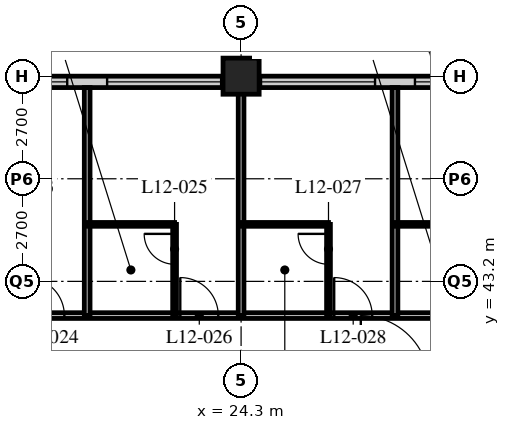
"""IFC4 building model, lengths in metres.
Left out: names, types, materials, properties, quantities, classifications, styles, units other than length and angle.
Written with IfcOpenShell. Run it as: python <this file> out.ifc"""

import sys

from ifc_helpers import new_model, si_unit, direction, frame, frame_2d, origin, origin_2d, place, context, subcontext, project, spatial, rectangle, hollow_rectangle, extrude, element, fill, save


model = new_model("IFC4")
c1 = context("Model", 3, precision=1e-05, world=origin(), true_north=direction((0.0, 1.0)))
c2 = subcontext(c1, "Body", "Model", "MODEL_VIEW")
j1 = project(units=[si_unit("LENGTHUNIT", "METRE"), si_unit("PLANEANGLEUNIT", "RADIAN")], contexts=[c1])
p1 = place(None, origin())
s1 = spatial("IfcSite", under=j1, at=p1, CompositionType="ELEMENT")
p2 = place(p1, origin())
s2 = spatial("IfcBuilding", under=s1, at=p2, CompositionType="ELEMENT")
p3 = place(p2, frame((0.0, 0.0, 53.4)))
s3 = spatial("IfcBuildingStorey", under=s2, at=p3, CompositionType="ELEMENT", Elevation=53.4)
p4 = place(p3, frame((24.3, 48.6, 0.0), z_axis=(0.0, 0.0, 1.0), x_axis=(1.0, 0.0, 0.0)))
e1 = element("IfcColumn", 1, at=p4, inside=s3, PredefinedType="COLUMN", context=c2, shape_type="SweptSolid", body=[
    extrude(hollow_rectangle(XDim=0.95, YDim=0.95, WallThickness=0.095, at=origin_2d()), origin(), (0.0, 0.0, 1.0), 3.4),
])
p5 = place(p3, frame((48.3, 48.45, 0.0), z_axis=(0.0, 0.0, 1.0), x_axis=(-1.0, 0.0, 0.0)))
e2 = element("IfcWall", 2, at=p5, inside=s3, PredefinedType="SOLIDWALL", context=c2, shape_type="SweptSolid", body=[
    extrude(rectangle(XDim=40.2, YDim=0.3, at=frame_2d((20.1, 0.0))), origin(), (0.0, 0.0, 1.0), 3.19),
])
p6 = place(p5, frame((0.225, 0.0, 0.9)))
e3 = element("IfcOpeningElement", 3, at=p6, cuts=e2, PredefinedType="OPENING", context=c2, shape_type="SweptSolid", body=[
    extrude(rectangle(XDim=3.0, YDim=2.0, at=frame_2d((1.5, 1.0))), frame((0.0, 0.16, 0.0), z_axis=(0.0, -1.0, 0.0), x_axis=(1.0, 0.0, 0.0)), (0.0, 0.0, 1.0), 0.32),
])
p7 = place(p5, frame((4.275, 0.0, 0.9)))
e4 = element("IfcOpeningElement", 4, at=p7, cuts=e2, PredefinedType="OPENING", context=c2, shape_type="SweptSolid", body=[
    extrude(rectangle(XDim=3.0, YDim=2.0, at=frame_2d((1.5, 1.0))), frame((0.0, 0.16, 0.0), z_axis=(0.0, -1.0, 0.0), x_axis=(1.0, 0.0, 0.0)), (0.0, 0.0, 1.0), 0.32),
])
p8 = place(p5, frame((8.325, 0.0, 0.9)))
e5 = element("IfcOpeningElement", 5, at=p8, cuts=e2, PredefinedType="OPENING", context=c2, shape_type="SweptSolid", body=[
    extrude(rectangle(XDim=3.0, YDim=2.0, at=frame_2d((1.5, 1.0))), frame((0.0, 0.16, 0.0), z_axis=(0.0, -1.0, 0.0), x_axis=(1.0, 0.0, 0.0)), (0.0, 0.0, 1.0), 0.32),
])
p9 = place(p5, frame((12.375, 0.0, 0.9)))
e6 = element("IfcOpeningElement", 6, at=p9, cuts=e2, PredefinedType="OPENING", context=c2, shape_type="SweptSolid", body=[
    extrude(rectangle(XDim=3.0, YDim=2.0, at=frame_2d((1.5, 1.0))), frame((0.0, 0.16, 0.0), z_axis=(0.0, -1.0, 0.0), x_axis=(1.0, 0.0, 0.0)), (0.0, 0.0, 1.0), 0.32),
])
p10 = place(p5, frame((16.425, 0.0, 0.9)))
e7 = element("IfcOpeningElement", 7, at=p10, cuts=e2, PredefinedType="OPENING", context=c2, shape_type="SweptSolid", body=[
    extrude(rectangle(XDim=3.0, YDim=2.0, at=frame_2d((1.5, 1.0))), frame((0.0, 0.16, 0.0), z_axis=(0.0, -1.0, 0.0), x_axis=(1.0, 0.0, 0.0)), (0.0, 0.0, 1.0), 0.32),
])
p11 = place(p5, frame((20.475, 0.0, 0.9)))
e8 = element("IfcOpeningElement", 8, at=p11, cuts=e2, PredefinedType="OPENING", context=c2, shape_type="SweptSolid", body=[
    extrude(rectangle(XDim=3.0, YDim=2.0, at=frame_2d((1.5, 1.0))), frame((0.0, 0.16, 0.0), z_axis=(0.0, -1.0, 0.0), x_axis=(1.0, 0.0, 0.0)), (0.0, 0.0, 1.0), 0.32),
])
p12 = place(p5, frame((24.525, 0.0, 0.9)))
e9 = element("IfcOpeningElement", 9, at=p12, cuts=e2, PredefinedType="OPENING", context=c2, shape_type="SweptSolid", body=[
    extrude(rectangle(XDim=3.0, YDim=2.0, at=frame_2d((1.5, 1.0))), frame((0.0, 0.16, 0.0), z_axis=(0.0, -1.0, 0.0), x_axis=(1.0, 0.0, 0.0)), (0.0, 0.0, 1.0), 0.32),
])
p13 = place(p5, frame((28.575, 0.0, 0.9)))
e10 = element("IfcOpeningElement", 10, at=p13, cuts=e2, PredefinedType="OPENING", context=c2, shape_type="SweptSolid", body=[
    extrude(rectangle(XDim=3.0, YDim=2.0, at=frame_2d((1.5, 1.0))), frame((0.0, 0.16, 0.0), z_axis=(0.0, -1.0, 0.0), x_axis=(1.0, 0.0, 0.0)), (0.0, 0.0, 1.0), 0.32),
])
p14 = place(p5, frame((32.625, 0.0, 0.9)))
e11 = element("IfcOpeningElement", 11, at=p14, cuts=e2, PredefinedType="OPENING", context=c2, shape_type="SweptSolid", body=[
    extrude(rectangle(XDim=3.0, YDim=2.0, at=frame_2d((1.5, 1.0))), frame((0.0, 0.16, 0.0), z_axis=(0.0, -1.0, 0.0), x_axis=(1.0, 0.0, 0.0)), (0.0, 0.0, 1.0), 0.32),
])
p15 = place(p5, frame((36.675, 0.0, 0.9)))
e12 = element("IfcOpeningElement", 12, at=p15, cuts=e2, PredefinedType="OPENING", context=c2, shape_type="SweptSolid", body=[
    extrude(rectangle(XDim=3.0, YDim=2.0, at=frame_2d((1.5, 1.0))), frame((0.0, 0.16, 0.0), z_axis=(0.0, -1.0, 0.0), x_axis=(1.0, 0.0, 0.0)), (0.0, 0.0, 1.0), 0.32),
])
p16 = place(p3, frame((12.15, 42.3, 0.0), z_axis=(0.0, 0.0, 1.0), x_axis=(1.0, 0.0, 0.0)))
e13 = element("IfcWall", 13, at=p16, inside=s3, PredefinedType="PARTITIONING", context=c2, shape_type="SweptSolid", body=[
    extrude(rectangle(XDim=32.4, YDim=0.15, at=frame_2d((16.2, 0.0))), origin(), (0.0, 0.0, 1.0), 3.19),
])
p17 = place(p16, frame((6.5, 0.0, 0.0)))
e14 = element("IfcOpeningElement", 14, at=p17, cuts=e13, PredefinedType="OPENING", context=c2, shape_type="SweptSolid", body=[
    extrude(rectangle(XDim=1.0, YDim=2.1, at=frame_2d((0.5, 1.05))), frame((0.0, 0.085, 0.0), z_axis=(0.0, -1.0, 0.0), x_axis=(1.0, 0.0, 0.0)), (0.0, 0.0, 1.0), 0.17),
])
p18 = place(p16, frame((10.55, 0.0, 0.0)))
e15 = element("IfcOpeningElement", 15, at=p18, cuts=e13, PredefinedType="OPENING", context=c2, shape_type="SweptSolid", body=[
    extrude(rectangle(XDim=1.0, YDim=2.1, at=frame_2d((0.5, 1.05))), frame((0.0, 0.085, 0.0), z_axis=(0.0, -1.0, 0.0), x_axis=(1.0, 0.0, 0.0)), (0.0, 0.0, 1.0), 0.17),
])
p19 = place(p16, frame((14.6, 0.0, 0.0)))
e16 = element("IfcOpeningElement", 16, at=p19, cuts=e13, PredefinedType="OPENING", context=c2, shape_type="SweptSolid", body=[
    extrude(rectangle(XDim=1.0, YDim=2.1, at=frame_2d((0.5, 1.05))), frame((0.0, 0.085, 0.0), z_axis=(0.0, -1.0, 0.0), x_axis=(1.0, 0.0, 0.0)), (0.0, 0.0, 1.0), 0.17),
])
p20 = place(p16, frame((18.65, 0.0, 0.0)))
e17 = element("IfcOpeningElement", 17, at=p20, cuts=e13, PredefinedType="OPENING", context=c2, shape_type="SweptSolid", body=[
    extrude(rectangle(XDim=1.0, YDim=2.1, at=frame_2d((0.5, 1.05))), frame((0.0, 0.085, 0.0), z_axis=(0.0, -1.0, 0.0), x_axis=(1.0, 0.0, 0.0)), (0.0, 0.0, 1.0), 0.17),
])
p21 = place(p16, frame((22.7, 0.0, 0.0)))
e18 = element("IfcOpeningElement", 18, at=p21, cuts=e13, PredefinedType="OPENING", context=c2, shape_type="SweptSolid", body=[
    extrude(rectangle(XDim=1.0, YDim=2.1, at=frame_2d((0.5, 1.05))), frame((0.0, 0.085, 0.0), z_axis=(0.0, -1.0, 0.0), x_axis=(1.0, 0.0, 0.0)), (0.0, 0.0, 1.0), 0.17),
])
p22 = place(p16, frame((26.75, 0.0, 0.0)))
e19 = element("IfcOpeningElement", 19, at=p22, cuts=e13, PredefinedType="OPENING", context=c2, shape_type="SweptSolid", body=[
    extrude(rectangle(XDim=1.0, YDim=2.1, at=frame_2d((0.5, 1.05))), frame((0.0, 0.085, 0.0), z_axis=(0.0, -1.0, 0.0), x_axis=(1.0, 0.0, 0.0)), (0.0, 0.0, 1.0), 0.17),
])
p23 = place(p16, frame((28.775, 0.0, 0.0)))
e20 = element("IfcOpeningElement", 20, at=p23, cuts=e13, PredefinedType="OPENING", context=c2, shape_type="SweptSolid", body=[
    extrude(rectangle(XDim=1.0, YDim=2.1, at=frame_2d((0.5, 1.05))), frame((0.0, 0.085, 0.0), z_axis=(0.0, -1.0, 0.0), x_axis=(1.0, 0.0, 0.0)), (0.0, 0.0, 1.0), 0.17),
])
p24 = place(p16, frame((2.625, 0.0, 0.0)))
e21 = element("IfcOpeningElement", 21, at=p24, cuts=e13, PredefinedType="OPENING", context=c2, shape_type="SweptSolid", body=[
    extrude(rectangle(XDim=1.0, YDim=2.1, at=frame_2d((0.5, 1.05))), frame((0.0, 0.085, 0.0), z_axis=(0.0, -1.0, 0.0), x_axis=(1.0, 0.0, 0.0)), (0.0, 0.0, 1.0), 0.17),
])
p25 = place(p3, frame((20.25, 42.3, 0.0), z_axis=(0.0, 0.0, 1.0), x_axis=(0.0, 1.0, 0.0)))
e22 = element("IfcWall", 22, at=p25, inside=s3, PredefinedType="PARTITIONING", context=c2, shape_type="SweptSolid", body=[
    extrude(rectangle(XDim=6.0, YDim=0.15, at=frame_2d((3.0, 0.0))), origin(), (0.0, 0.0, 1.0), 3.19),
])
p26 = place(p3, frame((20.25, 44.7, 0.0), z_axis=(0.0, 0.0, 1.0), x_axis=(1.0, 0.0, 0.0)))
e23 = element("IfcWall", 23, at=p26, inside=s3, PredefinedType="PARTITIONING", context=c2, shape_type="SweptSolid", body=[
    extrude(rectangle(XDim=2.3, YDim=0.1, at=frame_2d((1.15, 0.0))), origin(), (0.0, 0.0, 1.0), 3.19),
])
p27 = place(p3, frame((22.55, 42.3, 0.0), z_axis=(0.0, 0.0, 1.0), x_axis=(0.0, 1.0, 0.0)))
e24 = element("IfcWall", 24, at=p27, inside=s3, PredefinedType="PARTITIONING", context=c2, shape_type="SweptSolid", body=[
    extrude(rectangle(XDim=2.4, YDim=0.1, at=frame_2d((1.2, 0.0))), origin(), (0.0, 0.0, 1.0), 3.19),
])
p28 = place(p27, frame((1.35, 0.0, 0.0)))
e25 = element("IfcOpeningElement", 25, at=p28, cuts=e24, PredefinedType="OPENING", context=c2, shape_type="SweptSolid", body=[
    extrude(rectangle(XDim=0.8, YDim=2.1, at=frame_2d((0.4, 1.05))), frame((0.0, 0.06, 0.0), z_axis=(0.0, -1.0, 0.0), x_axis=(1.0, 0.0, 0.0)), (0.0, 0.0, 1.0), 0.12),
])
p29 = place(p3, frame((24.3, 42.3, 0.0), z_axis=(0.0, 0.0, 1.0), x_axis=(0.0, 1.0, 0.0)))
e26 = element("IfcWall", 26, at=p29, inside=s3, PredefinedType="PARTITIONING", context=c2, shape_type="SweptSolid", body=[
    extrude(rectangle(XDim=6.0, YDim=0.15, at=frame_2d((3.0, 0.0))), origin(), (0.0, 0.0, 1.0), 2.578),
])
p30 = place(p3, frame((24.3, 44.7, 0.0), z_axis=(0.0, 0.0, 1.0), x_axis=(1.0, 0.0, 0.0)))
e27 = element("IfcWall", 27, at=p30, inside=s3, PredefinedType="PARTITIONING", context=c2, shape_type="SweptSolid", body=[
    extrude(rectangle(XDim=2.3, YDim=0.1, at=frame_2d((1.15, 0.0))), origin(), (0.0, 0.0, 1.0), 3.19),
])
p31 = place(p3, frame((26.6, 42.3, 0.0), z_axis=(0.0, 0.0, 1.0), x_axis=(0.0, 1.0, 0.0)))
e28 = element("IfcWall", 28, at=p31, inside=s3, PredefinedType="PARTITIONING", context=c2, shape_type="SweptSolid", body=[
    extrude(rectangle(XDim=2.4, YDim=0.1, at=frame_2d((1.2, 0.0))), origin(), (0.0, 0.0, 1.0), 3.19),
])
p32 = place(p31, frame((1.35, 0.0, 0.0)))
e29 = element("IfcOpeningElement", 29, at=p32, cuts=e28, PredefinedType="OPENING", context=c2, shape_type="SweptSolid", body=[
    extrude(rectangle(XDim=0.8, YDim=2.1, at=frame_2d((0.4, 1.05))), frame((0.0, 0.06, 0.0), z_axis=(0.0, -1.0, 0.0), x_axis=(1.0, 0.0, 0.0)), (0.0, 0.0, 1.0), 0.12),
])
p33 = place(p3, frame((28.35, 42.3, 0.0), z_axis=(0.0, 0.0, 1.0), x_axis=(0.0, 1.0, 0.0)))
e30 = element("IfcWall", 30, at=p33, inside=s3, PredefinedType="PARTITIONING", context=c2, shape_type="SweptSolid", body=[
    extrude(rectangle(XDim=6.0, YDim=0.15, at=frame_2d((3.0, 0.0))), origin(), (0.0, 0.0, 1.0), 3.19),
])
p34 = place(p3, frame((28.35, 44.7, 0.0), z_axis=(0.0, 0.0, 1.0), x_axis=(1.0, 0.0, 0.0)))
e31 = element("IfcWall", 31, at=p34, inside=s3, PredefinedType="PARTITIONING", context=c2, shape_type="SweptSolid", body=[
    extrude(rectangle(XDim=2.3, YDim=0.1, at=frame_2d((1.15, 0.0))), origin(), (0.0, 0.0, 1.0), 3.19),
])
p35 = place(p10, origin())
e32 = element("IfcWindow", 32, at=p35, inside=s3, PartitioningType="SINGLE_PANEL", PredefinedType="WINDOW", context=c2, shape_type="SweptSolid", body=[
    extrude(rectangle(XDim=3.0, YDim=2.0, at=frame_2d((1.5, 1.0))), frame((0.0, 0.03, 0.0), z_axis=(0.0, -1.0, 0.0), x_axis=(1.0, 0.0, 0.0)), (0.0, 0.0, 1.0), 0.06),
])
fill(e7, e32)
p36 = place(p11, origin())
e33 = element("IfcWindow", 33, at=p36, inside=s3, PartitioningType="SINGLE_PANEL", PredefinedType="WINDOW", context=c2, shape_type="SweptSolid", body=[
    extrude(rectangle(XDim=3.0, YDim=2.0, at=frame_2d((1.5, 1.0))), frame((0.0, 0.03, 0.0), z_axis=(0.0, -1.0, 0.0), x_axis=(1.0, 0.0, 0.0)), (0.0, 0.0, 1.0), 0.06),
])
fill(e8, e33)
p37 = place(p12, origin())
e34 = element("IfcWindow", 34, at=p37, inside=s3, PartitioningType="SINGLE_PANEL", PredefinedType="WINDOW", context=c2, shape_type="SweptSolid", body=[
    extrude(rectangle(XDim=3.0, YDim=2.0, at=frame_2d((1.5, 1.0))), frame((0.0, 0.03, 0.0), z_axis=(0.0, -1.0, 0.0), x_axis=(1.0, 0.0, 0.0)), (0.0, 0.0, 1.0), 0.06),
])
fill(e9, e34)
p38 = place(p13, origin())
e35 = element("IfcWindow", 35, at=p38, inside=s3, PartitioningType="SINGLE_PANEL", PredefinedType="WINDOW", context=c2, shape_type="SweptSolid", body=[
    extrude(rectangle(XDim=3.0, YDim=2.0, at=frame_2d((1.5, 1.0))), frame((0.0, 0.03, 0.0), z_axis=(0.0, -1.0, 0.0), x_axis=(1.0, 0.0, 0.0)), (0.0, 0.0, 1.0), 0.06),
])
fill(e10, e35)
p39 = place(p17, origin())
e36 = element("IfcDoor", 36, at=p39, inside=s3, OperationType="SINGLE_SWING_LEFT", PredefinedType="DOOR", context=c2, shape_type="SweptSolid", body=[
    extrude(rectangle(XDim=1.0, YDim=2.1, at=frame_2d((0.5, 1.05))), frame((0.0, 0.025, 0.0), z_axis=(0.0, -1.0, 0.0), x_axis=(1.0, 0.0, 0.0)), (0.0, 0.0, 1.0), 0.05),
])
fill(e14, e36)
p40 = place(p28, origin())
e37 = element("IfcDoor", 37, at=p40, inside=s3, OperationType="SINGLE_SWING_RIGHT", PredefinedType="DOOR", context=c2, shape_type="SweptSolid", body=[
    extrude(rectangle(XDim=0.8, YDim=2.1, at=frame_2d((0.4, 1.05))), frame((0.0, 0.025, 0.0), z_axis=(0.0, -1.0, 0.0), x_axis=(1.0, 0.0, 0.0)), (0.0, 0.0, 1.0), 0.05),
])
fill(e25, e37)
p41 = place(p18, origin())
e38 = element("IfcDoor", 38, at=p41, inside=s3, OperationType="SINGLE_SWING_LEFT", PredefinedType="DOOR", context=c2, shape_type="SweptSolid", body=[
    extrude(rectangle(XDim=1.0, YDim=2.1, at=frame_2d((0.5, 1.05))), frame((0.0, 0.025, 0.0), z_axis=(0.0, -1.0, 0.0), x_axis=(1.0, 0.0, 0.0)), (0.0, 0.0, 1.0), 0.05),
])
fill(e15, e38)
p42 = place(p32, origin())
e39 = element("IfcDoor", 39, at=p42, inside=s3, OperationType="SINGLE_SWING_RIGHT", PredefinedType="DOOR", context=c2, shape_type="SweptSolid", body=[
    extrude(rectangle(XDim=0.8, YDim=2.1, at=frame_2d((0.4, 1.05))), frame((0.0, 0.025, 0.0), z_axis=(0.0, -1.0, 0.0), x_axis=(1.0, 0.0, 0.0)), (0.0, 0.0, 1.0), 0.05),
])
fill(e29, e39)
p43 = place(p19, origin())
e40 = element("IfcDoor", 40, at=p43, inside=s3, OperationType="SINGLE_SWING_LEFT", PredefinedType="DOOR", context=c2, shape_type="SweptSolid", body=[
    extrude(rectangle(XDim=1.0, YDim=2.1, at=frame_2d((0.5, 1.05))), frame((0.0, 0.025, 0.0), z_axis=(0.0, -1.0, 0.0), x_axis=(1.0, 0.0, 0.0)), (0.0, 0.0, 1.0), 0.05),
])
fill(e16, e40)
save(model, sys.argv[1])
